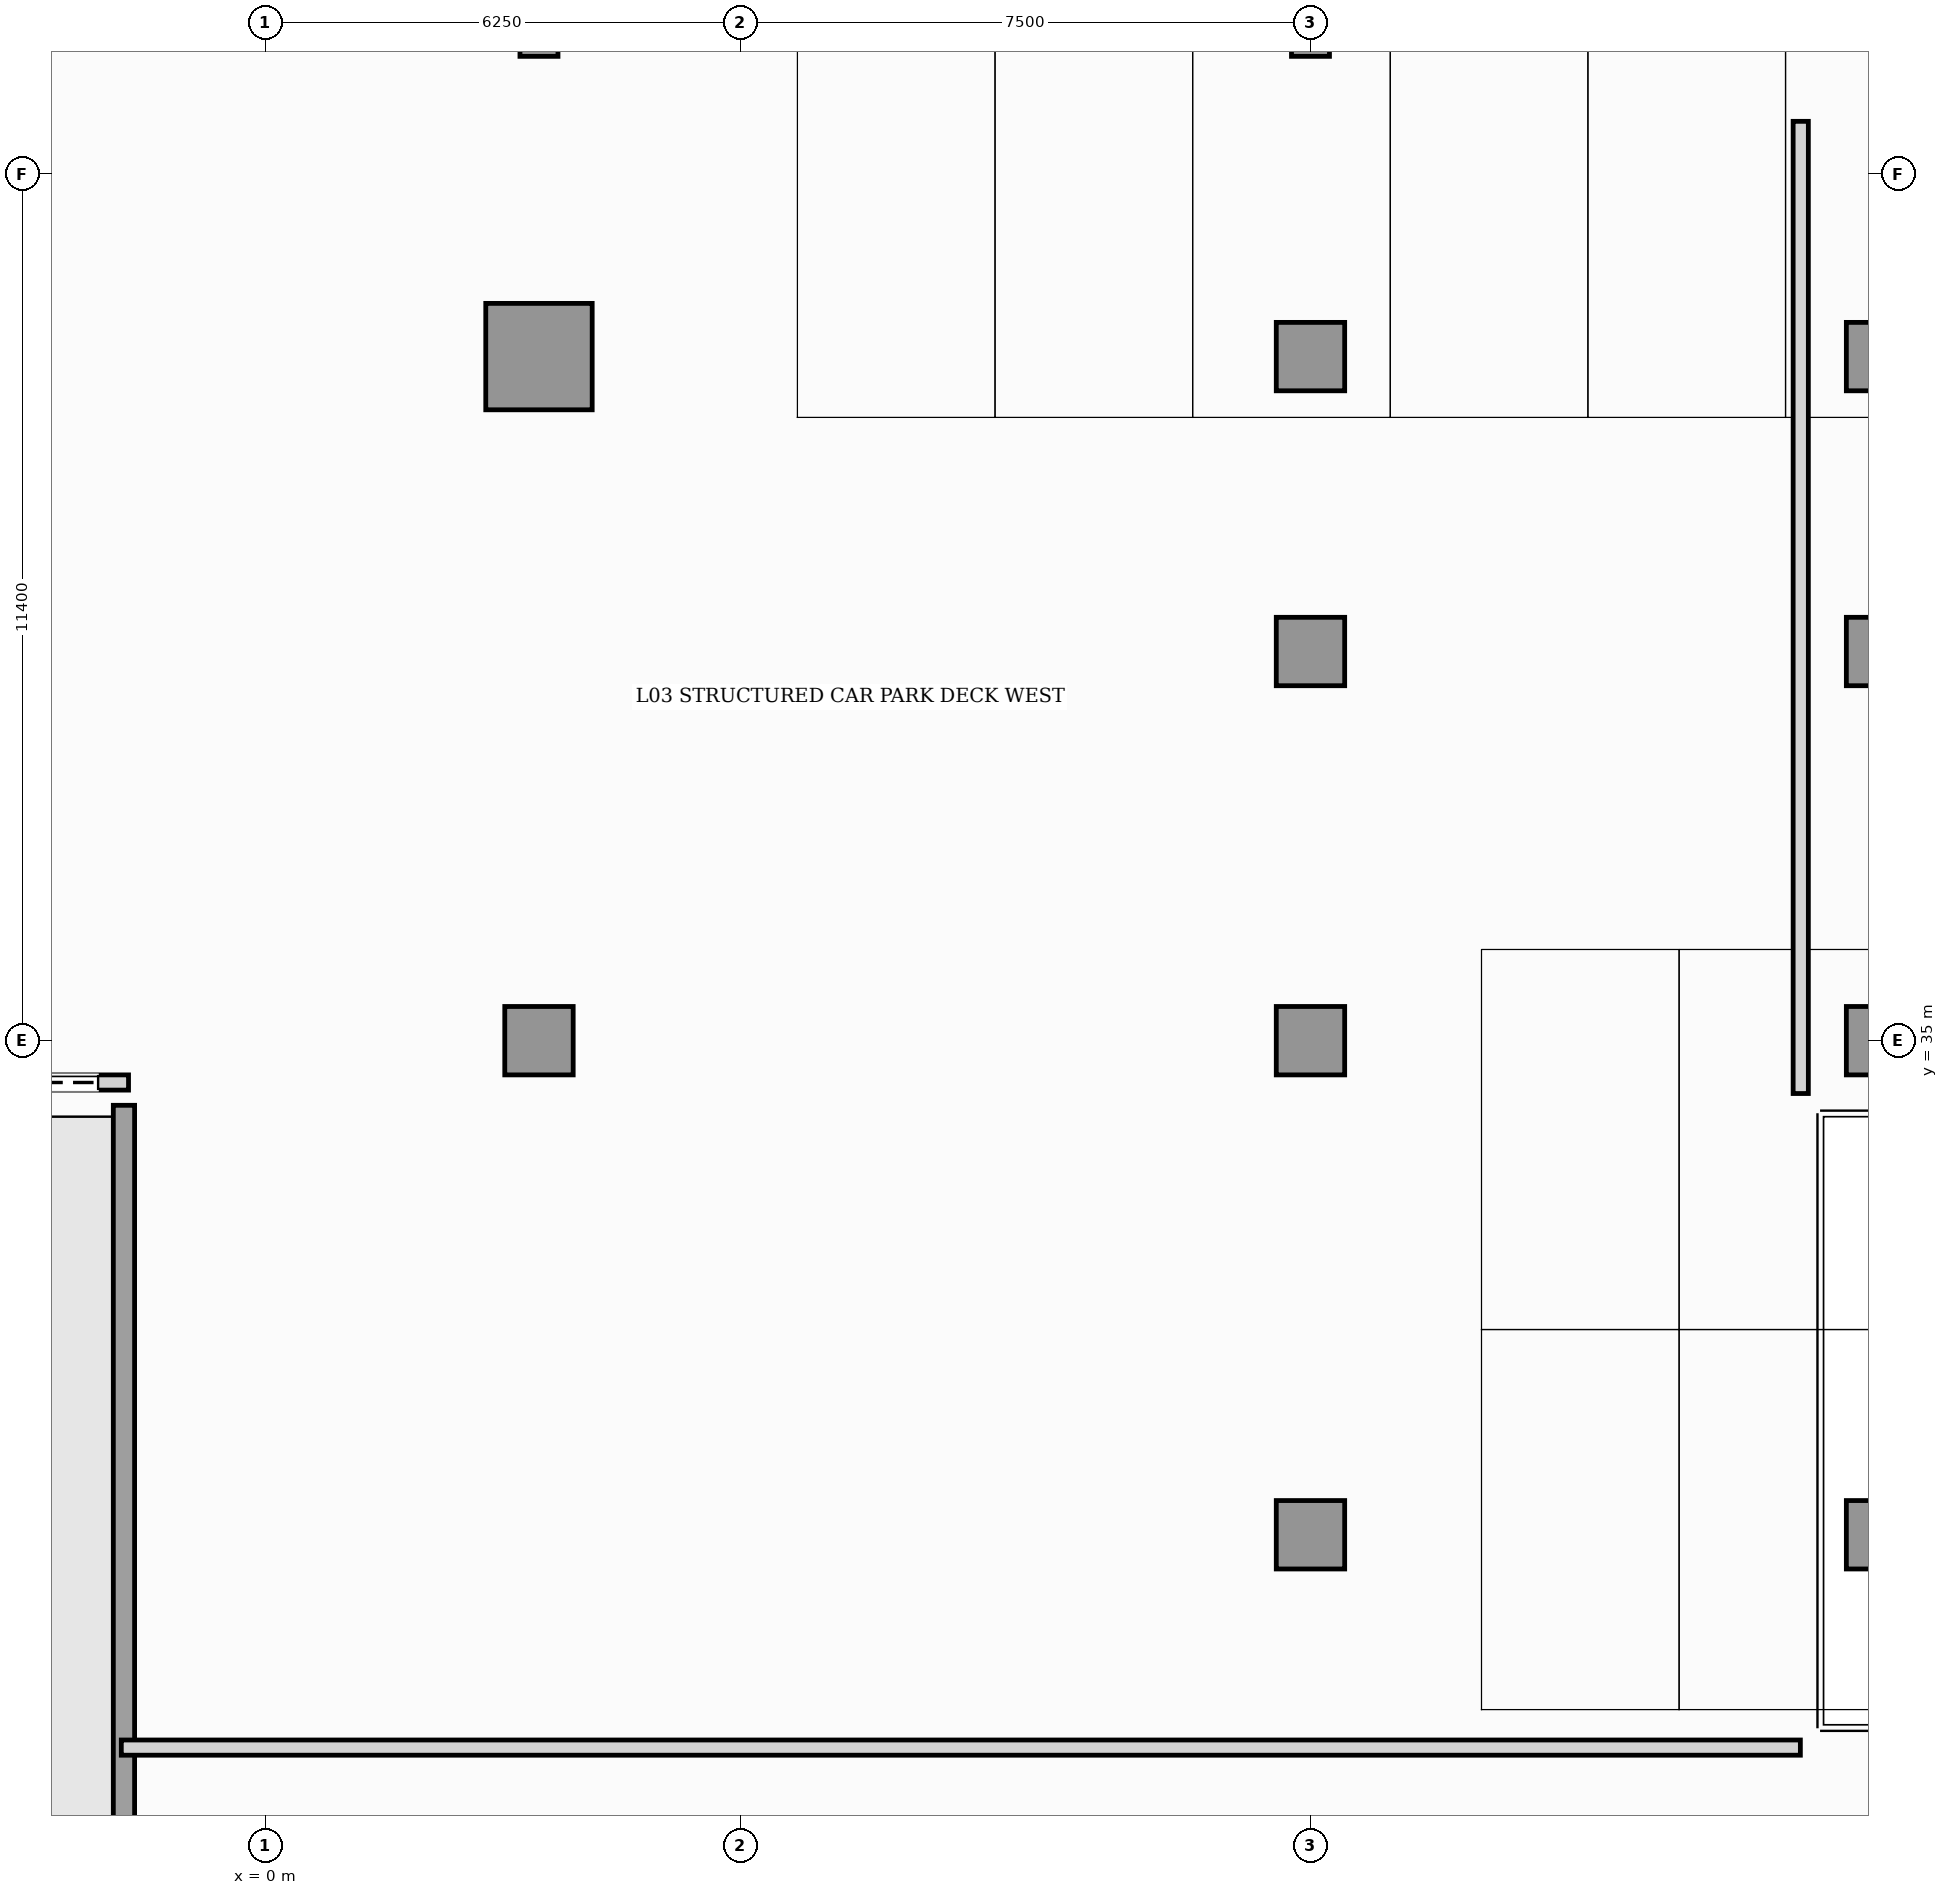
"""IFC4 building model, lengths in metres.
Left out: names, types, materials, properties, quantities, classifications, styles, units other than length and angle.
Written with IfcOpenShell. Run it as: python <this file> out.ifc"""

import sys

from ifc_helpers import new_model, si_unit, direction, frame, frame_2d, origin, origin_2d, place, context, subcontext, project, spatial, rectangle, hollow_rectangle, extrude, element, fill, save


model = new_model("IFC4")
c1 = context("Model", 3, precision=1e-05, world=origin(), true_north=direction((0.0, 1.0)))
c2 = subcontext(c1, "Body", "Model", "MODEL_VIEW")
j1 = project(units=[si_unit("LENGTHUNIT", "METRE"), si_unit("PLANEANGLEUNIT", "RADIAN")], contexts=[c1])
p1 = place(None, origin())
s1 = spatial("IfcSite", under=j1, at=p1, CompositionType="ELEMENT")
p2 = place(p1, origin())
s2 = spatial("IfcBuilding", under=s1, at=p2, CompositionType="ELEMENT")
p3 = place(p2, frame((0.0, 0.0, 15.0)))
s3 = spatial("IfcBuildingStorey", under=s2, at=p3, CompositionType="ELEMENT", Elevation=15.0)
p4 = place(p3, frame((-1.86, 3.88, 0.0), z_axis=(0.0, 0.0, 1.0), x_axis=(0.0, 1.0, 0.0)))
e1 = element("IfcWall", 1, at=p4, inside=s3, PredefinedType="SHEAR", context=c2, shape_type="SweptSolid", body=[
    extrude(rectangle(XDim=30.27, YDim=0.28, at=frame_2d((15.135, 0.0))), origin(), (0.0, 0.0, 1.0), 4.5),
])
p5 = place(p3, frame((3.6, 44.0, 0.0), z_axis=(0.0, 0.0, 1.0), x_axis=(1.0, 0.0, 0.0)))
e2 = element("IfcColumn", 2, at=p5, inside=s3, PredefinedType="USERDEFINED", context=c2, shape_type="SweptSolid", body=[
    extrude(hollow_rectangle(XDim=1.4, YDim=1.4, WallThickness=0.08, at=origin_2d()), origin(), (0.0, 0.0, 1.0), 4.8),
])
for number, where, z_axis, x_axis in (
    (3, (3.6, 35.0, 0.0), (0.0, 0.0, 1.0), (1.0, 0.0, 0.0)),
    (4, (13.75, 35.0, 0.0), (0.0, 0.0, 1.0), (1.0, 0.0, 0.0)),
    (5, (13.75, 44.0, 0.0), (0.0, 0.0, 1.0), (1.0, 0.0, 0.0)),
    (6, (13.75, 28.5, 0.0), (0.0, 0.0, 1.0), (1.0, 0.0, 0.0)),
    (7, (21.25, 28.5, 0.0), (0.0, 0.0, 1.0), (1.0, 0.0, 0.0)),
    (8, (21.25, 35.0, 0.0), (0.0, 0.0, 1.0), (1.0, 0.0, 0.0)),
    (9, (13.75, 40.12, 0.0), (0.0, 0.0, 1.0), (1.0, 0.0, 0.0)),
    (10, (21.25, 40.12, 0.0), (0.0, 0.0, 1.0), (1.0, 0.0, 0.0)),
    (11, (21.25, 44.0, 0.0), (0.0, 0.0, 1.0), (1.0, 0.0, 0.0)),
):
    element("IfcColumn", number, at=place(p3, frame(where, z_axis=z_axis, x_axis=x_axis)), inside=s3, PredefinedType="COLUMN", context=c2, shape_type="SweptSolid", body=[
        extrude(rectangle(XDim=0.9, YDim=0.9, at=origin_2d()), origin(), (0.0, 0.0, 1.0), 4.8),
    ])
for number, where, z_axis, x_axis in (
    (12, (3.6, 48.2, 0.0), (0.0, 0.0, 1.0), (1.0, 0.0, 0.0)),
    (13, (13.75, 48.2, 0.0), (0.0, 0.0, 1.0), (1.0, 0.0, 0.0)),
):
    element("IfcColumn", number, at=place(p3, frame(where, z_axis=z_axis, x_axis=x_axis)), inside=s3, PredefinedType="COLUMN", context=c2, shape_type="SweptSolid", body=[
        extrude(hollow_rectangle(XDim=0.5, YDim=0.5, WallThickness=0.032, at=origin_2d()), origin(), (0.0, 0.0, 1.0), 4.8),
    ])
p6 = place(p3, frame((-8.6, 34.45, 0.0), z_axis=(0.0, 0.0, 1.0), x_axis=(1.0, 0.0, 0.0)))
e14 = element("IfcWall", 14, at=p6, inside=s3, PredefinedType="PARTITIONING", context=c2, shape_type="SweptSolid", body=[
    extrude(rectangle(XDim=6.8, YDim=0.2, at=frame_2d((3.4, 0.0))), origin(), (0.0, 0.0, 1.0), 4.5),
])
p7 = place(p6, frame((0.4, 0.0, 0.0)))
e15 = element("IfcOpeningElement", 15, at=p7, cuts=e14, PredefinedType="OPENING", context=c2, shape_type="SweptSolid", body=[
    extrude(rectangle(XDim=6.0, YDim=3.2, at=frame_2d((3.0, 1.6))), frame((0.0, 0.11, 0.0), z_axis=(0.0, -1.0, 0.0), x_axis=(1.0, 0.0, 0.0)), (0.0, 0.0, 1.0), 0.22),
])
p8 = place(p3, frame((-1.895, 25.7, 0.0), z_axis=(0.0, 0.0, 1.0), x_axis=(1.0, 0.0, 0.0)))
e16 = element("IfcWall", 16, at=p8, inside=s3, PredefinedType="PARTITIONING", context=c2, shape_type="SweptSolid", body=[
    extrude(rectangle(XDim=22.09, YDim=0.2, at=frame_2d((11.045, 0.0))), origin(), (0.0, 0.0, 1.0), 4.5),
])
p9 = place(p3, frame((20.2, 34.305, 0.0), z_axis=(0.0, 0.0, 1.0), x_axis=(0.0, 1.0, 0.0)))
e17 = element("IfcWall", 17, at=p9, inside=s3, PredefinedType="PARTITIONING", context=c2, shape_type="SweptSolid", body=[
    extrude(rectangle(XDim=12.79, YDim=0.2, at=frame_2d((6.395, 0.0))), origin(), (0.0, 0.0, 1.0), 4.5),
])
p10 = place(p7, origin())
e18 = element("IfcDoor", 18, at=p10, inside=s3, OperationType="ROLLINGUP", PredefinedType="GATE", context=c2, shape_type="SweptSolid", body=[
    extrude(rectangle(XDim=6.0, YDim=3.2, at=frame_2d((3.0, 1.6))), frame((0.0, 0.025, 0.0), z_axis=(0.0, -1.0, 0.0), x_axis=(1.0, 0.0, 0.0)), (0.0, 0.0, 1.0), 0.05),
])
fill(e15, e18)
save(model, sys.argv[1])
